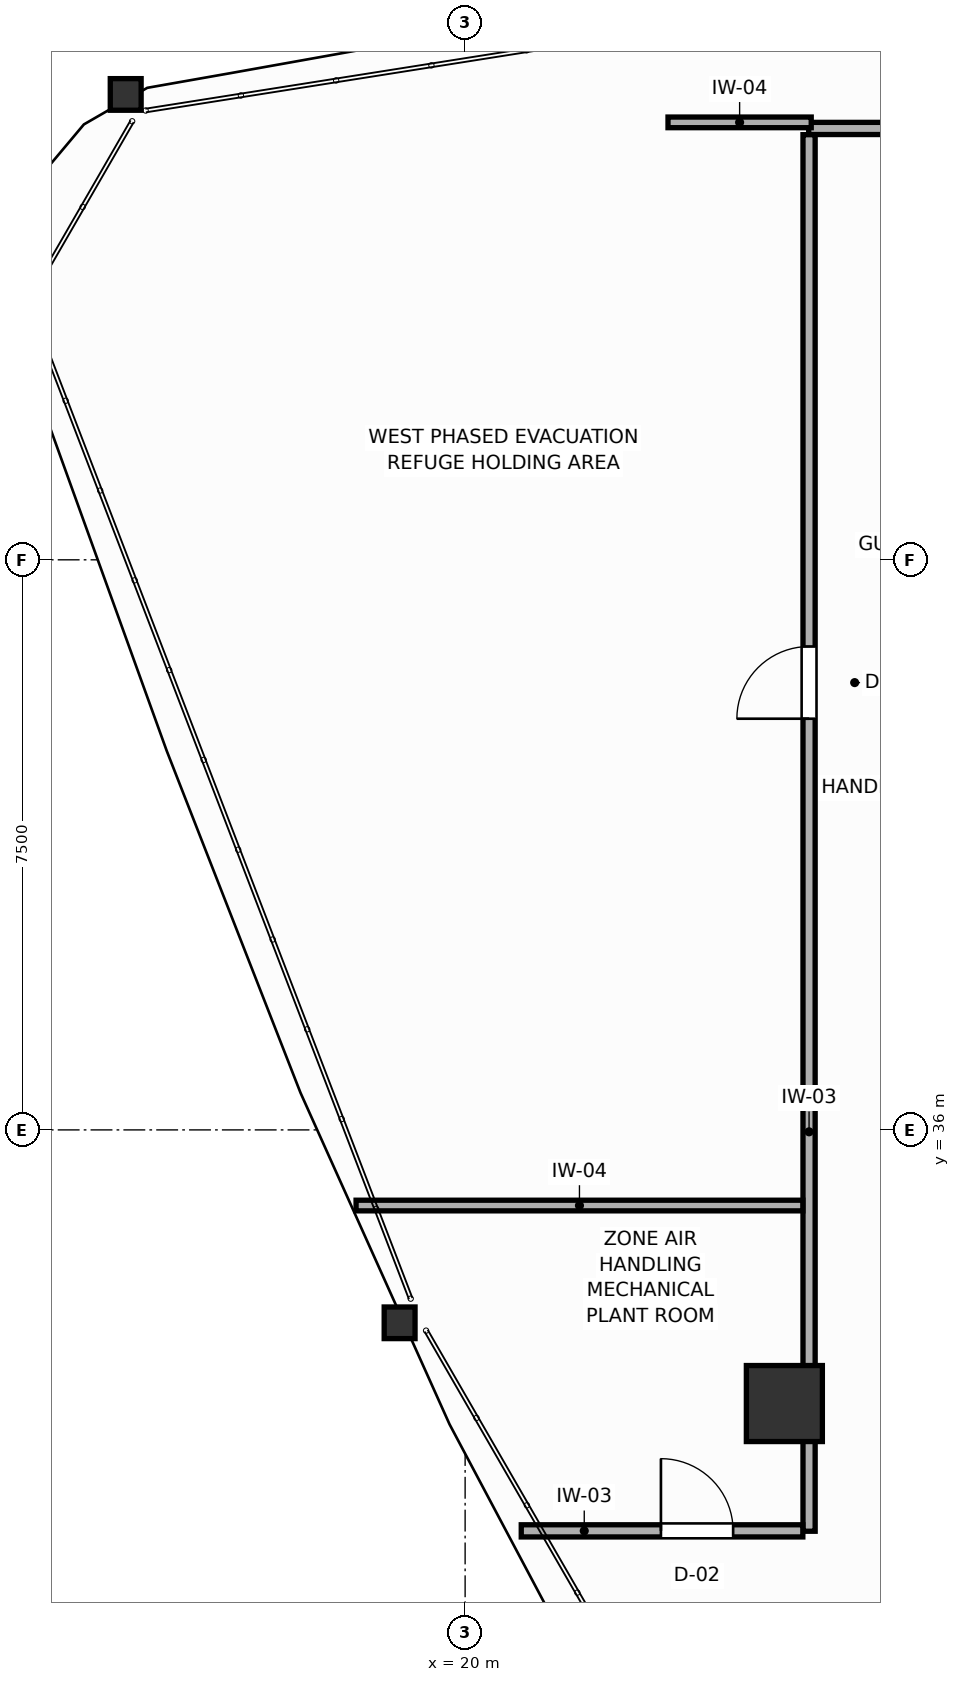
"""IFC4 building model, lengths in metres.
Left out: names, types, materials, properties, quantities, classifications, styles, units other than length and angle.
Written with IfcOpenShell. Run it as: python <this file> out.ifc"""

import sys

from ifc_helpers import new_model, si_unit, direction, frame, frame_2d, origin, origin_2d, place, context, subcontext, project, spatial, rectangle, i_section, extrude, source, transform, mapped, element, fill, save


model = new_model("IFC4")
c1 = context("Model", 3, precision=1e-05, world=origin(), true_north=direction((0.0, 1.0)))
c2 = subcontext(c1, "Body", "Model", "MODEL_VIEW")
j1 = project(units=[si_unit("LENGTHUNIT", "METRE"), si_unit("PLANEANGLEUNIT", "RADIAN")], contexts=[c1])
p1 = place(None, origin())
s1 = spatial("IfcSite", under=j1, at=p1, CompositionType="ELEMENT")
p2 = place(p1, origin())
s2 = spatial("IfcBuilding", under=s1, at=p2, CompositionType="ELEMENT")
p3 = place(p2, frame((0.0, 0.0, 201.0)))
s3 = spatial("IfcBuildingStorey", under=s2, at=p3, CompositionType="ELEMENT", Elevation=201.0)
m1 = source(origin(), c2, "Body", "SweptSolid", [
    extrude(rectangle(XDim=1.0, YDim=1.0, at=origin_2d()), origin(), (0.0, 0.0, 1.0), 4.8),
])
p4 = place(p3, frame((24.2, 32.4, 0.0), z_axis=(0.0, 0.0, 1.0), x_axis=(1.0, 0.0, 0.0)))
e1 = element("IfcColumn", 1, at=p4, inside=s3, PredefinedType="COLUMN", context=c2, shape_type="MappedRepresentation", body=[
    mapped(m1, transform((0.0, 0.0, 0.0), scale=1.0)),
])
m2 = source(origin(), c2, "Body", "SweptSolid", [
    extrude(i_section(OverallWidth=0.406, OverallDepth=0.416, WebThickness=0.027, FlangeThickness=0.044, FilletRadius=0.015, at=origin_2d()), origin(), (0.0, 0.0, 1.0), 4.8),
])
for number, where, z_axis, x_axis in (
    (2, (15.534, 49.623, 0.0), (0.0, 0.0, 1.0), (1.0, 0.0, 0.0)),
    (3, (19.138, 33.462, 0.0), (0.0, 0.0, 1.0), (1.0, 0.0, 0.0)),
):
    element("IfcColumn", number, at=place(p3, frame(where, z_axis=z_axis, x_axis=x_axis)), inside=s3, PredefinedType="COLUMN", context=c2, shape_type="MappedRepresentation", body=[
        mapped(m2, transform((0.0, 0.0, 0.0), scale=1.0)),
    ])
p5 = place(p3, frame((24.52, 49.175, 0.0), z_axis=(0.0, 0.0, 1.0), x_axis=(1.0, 0.0, 0.0)))
e4 = element("IfcWall", 4, at=p5, inside=s3, PredefinedType="PARTITIONING", context=c2, shape_type="SweptSolid", body=[
    extrude(rectangle(XDim=22.96, YDim=0.16, at=frame_2d((11.48, 0.0))), origin(), (0.0, 0.0, 1.0), 4.61),
])
p6 = place(p5, frame((8.307, 0.0, 0.0)))
e5 = element("IfcOpeningElement", 5, at=p6, cuts=e4, PredefinedType="OPENING", context=c2, shape_type="SweptSolid", body=[
    extrude(rectangle(XDim=0.95, YDim=2.05, at=frame_2d((0.475, 1.025))), frame((0.0, 0.09, 0.0), z_axis=(0.0, -1.0, 0.0), x_axis=(1.0, 0.0, 0.0)), (0.0, 0.0, 1.0), 0.18),
])
p7 = place(p3, frame((24.525, 30.72, 0.0), z_axis=(0.0, 0.0, 1.0), x_axis=(0.0, 1.0, 0.0)))
e6 = element("IfcWall", 6, at=p7, inside=s3, PredefinedType="PARTITIONING", context=c2, shape_type="SweptSolid", body=[
    extrude(rectangle(XDim=18.373, YDim=0.16, at=frame_2d((9.187, 0.0))), origin(), (0.0, 0.0, 1.0), 4.61),
])
p8 = place(p7, frame((10.69, 0.0, 0.0)))
e7 = element("IfcOpeningElement", 7, at=p8, cuts=e6, PredefinedType="OPENING", context=c2, shape_type="SweptSolid", body=[
    extrude(rectangle(XDim=0.95, YDim=2.05, at=frame_2d((0.475, 1.025))), frame((0.0, 0.09, 0.0), z_axis=(0.0, -1.0, 0.0), x_axis=(1.0, 0.0, 0.0)), (0.0, 0.0, 1.0), 0.18),
])
p9 = place(p3, frame((20.738, 30.725, 0.0), z_axis=(0.0, 0.0, 1.0), x_axis=(1.0, 0.0, 0.0)))
e8 = element("IfcWall", 8, at=p9, inside=s3, PredefinedType="PARTITIONING", context=c2, shape_type="SweptSolid", body=[
    extrude(rectangle(XDim=3.705, YDim=0.16, at=frame_2d((1.853, 0.0))), origin(), (0.0, 0.0, 1.0), 4.61),
])
p10 = place(p9, frame((1.838, 0.0, 0.0)))
e9 = element("IfcOpeningElement", 9, at=p10, cuts=e8, PredefinedType="OPENING", context=c2, shape_type="SweptSolid", body=[
    extrude(rectangle(XDim=0.95, YDim=2.05, at=frame_2d((0.475, 1.025))), frame((0.0, 0.09, 0.0), z_axis=(0.0, -1.0, 0.0), x_axis=(1.0, 0.0, 0.0)), (0.0, 0.0, 1.0), 0.18),
])
p11 = place(p3, frame((18.565, 35.005, 0.0), z_axis=(0.0, 0.0, 1.0), x_axis=(1.0, 0.0, 0.0)))
e10 = element("IfcWall", 10, at=p11, inside=s3, PredefinedType="PARTITIONING", context=c2, shape_type="SweptSolid", body=[
    extrude(rectangle(XDim=5.878, YDim=0.14, at=frame_2d((2.939, 0.0))), origin(), (0.0, 0.0, 1.0), 4.61),
])
p12 = place(p3, frame((22.669, 49.255, 0.0), z_axis=(0.0, 0.0, 1.0), x_axis=(1.0, 0.0, 0.0)))
e11 = element("IfcWall", 11, at=p12, inside=s3, PredefinedType="PARTITIONING", context=c2, shape_type="SweptSolid", body=[
    extrude(rectangle(XDim=1.884, YDim=0.14, at=frame_2d((0.942, 0.0))), origin(), (0.0, 0.0, 1.0), 4.61),
])
p13 = place(p8, origin())
e12 = element("IfcDoor", 12, at=p13, inside=s3, OperationType="SINGLE_SWING_LEFT", PredefinedType="DOOR", context=c2, shape_type="SweptSolid", body=[
    extrude(rectangle(XDim=0.95, YDim=2.05, at=frame_2d((0.475, 1.025))), frame((0.0, 0.025, 0.0), z_axis=(0.0, -1.0, 0.0), x_axis=(1.0, 0.0, 0.0)), (0.0, 0.0, 1.0), 0.05),
])
fill(e7, e12)
p14 = place(p10, origin())
e13 = element("IfcDoor", 13, at=p14, inside=s3, OperationType="SINGLE_SWING_LEFT", PredefinedType="DOOR", context=c2, shape_type="SweptSolid", body=[
    extrude(rectangle(XDim=0.95, YDim=2.05, at=frame_2d((0.475, 1.025))), frame((0.0, 0.025, 0.0), z_axis=(0.0, -1.0, 0.0), x_axis=(1.0, 0.0, 0.0)), (0.0, 0.0, 1.0), 0.05),
])
fill(e9, e13)
save(model, sys.argv[1])
